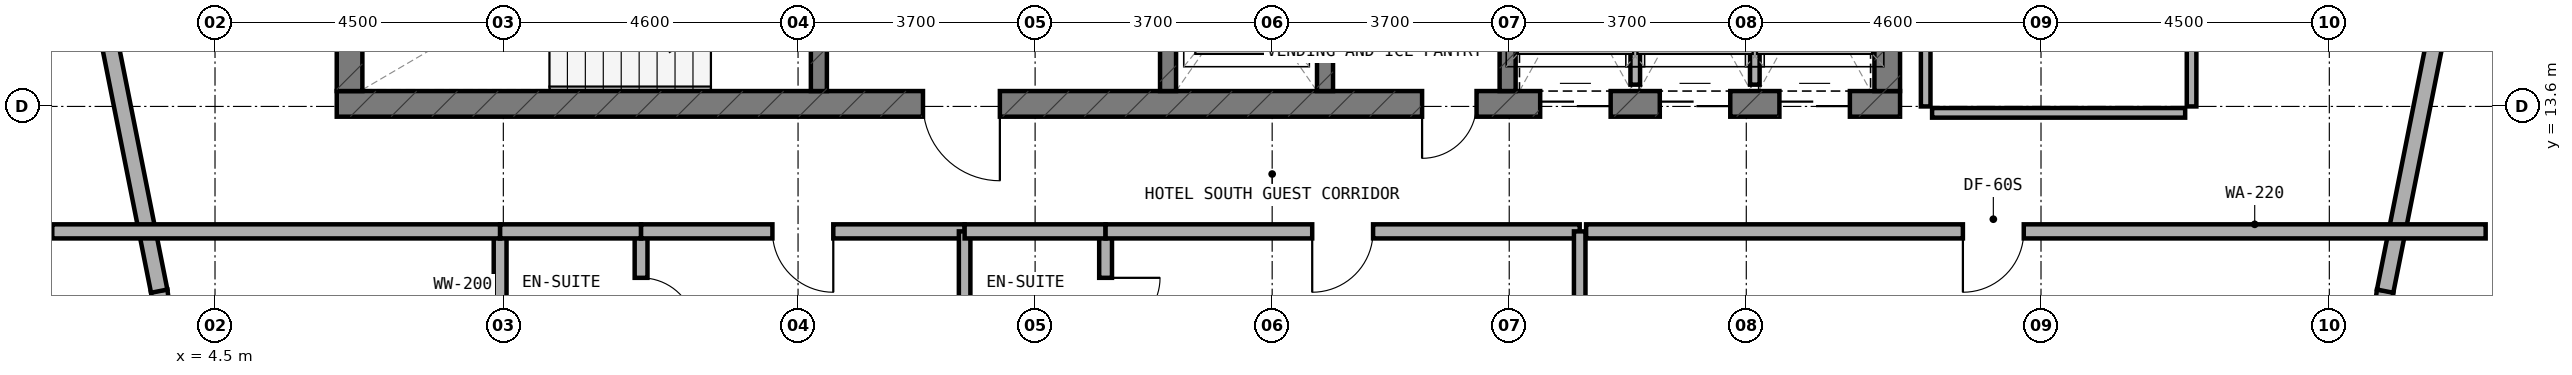
"""IFC4 building model, lengths in metres.
Left out: names, types, materials, properties, quantities, classifications, styles, units other than length and angle.
Written with IfcOpenShell. Run it as: python <this file> out.ifc"""

import sys

from ifc_helpers import new_model, si_unit, direction, frame, frame_2d, origin, place, context, subcontext, project, spatial, rectangle, extrude, element, fill, save


model = new_model("IFC4")
c1 = context("Model", 3, precision=1e-05, world=origin(), true_north=direction((0.0, 1.0)))
c2 = subcontext(c1, "Body", "Model", "MODEL_VIEW")
j1 = project(units=[si_unit("LENGTHUNIT", "METRE"), si_unit("PLANEANGLEUNIT", "RADIAN")], contexts=[c1])
p1 = place(None, origin())
s1 = spatial("IfcSite", under=j1, at=p1, CompositionType="ELEMENT")
p2 = place(p1, origin())
s2 = spatial("IfcBuilding", under=s1, at=p2, CompositionType="ELEMENT")
p3 = place(p2, frame((0.0, 0.0, 199.1)))
s3 = spatial("IfcBuildingStorey", under=s2, at=p3, CompositionType="ELEMENT", Elevation=199.1)
p4 = place(p3, frame((6.4, 13.64, 0.0), z_axis=(0.0, 0.0, 1.0), x_axis=(1.0, 0.0, 0.0)))
e1 = element("IfcWall", 1, at=p4, inside=s3, PredefinedType="SHEAR", context=c2, shape_type="SweptSolid", body=[
    extrude(rectangle(XDim=24.4, YDim=0.4, at=frame_2d((12.2, 0.0))), origin(), (0.0, 0.0, 1.0), 3.6),
])
p5 = place(p4, frame((9.15, 0.0, 0.0)))
e2 = element("IfcOpeningElement", 2, at=p5, cuts=e1, PredefinedType="OPENING", context=c2, shape_type="SweptSolid", body=[
    extrude(rectangle(XDim=1.2, YDim=2.15, at=frame_2d((0.6, 1.075))), frame((0.0, 0.21, 0.0), z_axis=(0.0, -1.0, 0.0), x_axis=(1.0, 0.0, 0.0)), (0.0, 0.0, 1.0), 0.42),
])
p6 = place(p4, frame((16.94, 0.0, 0.0)))
e3 = element("IfcOpeningElement", 3, at=p6, cuts=e1, PredefinedType="OPENING", context=c2, shape_type="SweptSolid", body=[
    extrude(rectangle(XDim=0.85, YDim=2.1, at=frame_2d((0.425, 1.05))), frame((0.0, 0.21, 0.0), z_axis=(0.0, -1.0, 0.0), x_axis=(1.0, 0.0, 0.0)), (0.0, 0.0, 1.0), 0.42),
])
p7 = place(p4, frame((18.783, 0.0, 0.0)))
e4 = element("IfcOpeningElement", 4, at=p7, cuts=e1, PredefinedType="OPENING", context=c2, shape_type="SweptSolid", body=[
    extrude(rectangle(XDim=1.1, YDim=2.15, at=frame_2d((0.55, 1.075))), frame((0.0, 0.21, 0.0), z_axis=(0.0, -1.0, 0.0), x_axis=(1.0, 0.0, 0.0)), (0.0, 0.0, 1.0), 0.42),
])
p8 = place(p4, frame((20.65, 0.0, 0.0)))
e5 = element("IfcOpeningElement", 5, at=p8, cuts=e1, PredefinedType="OPENING", context=c2, shape_type="SweptSolid", body=[
    extrude(rectangle(XDim=1.1, YDim=2.15, at=frame_2d((0.55, 1.075))), frame((0.0, 0.21, 0.0), z_axis=(0.0, -1.0, 0.0), x_axis=(1.0, 0.0, 0.0)), (0.0, 0.0, 1.0), 0.42),
])
p9 = place(p4, frame((22.517, 0.0, 0.0)))
e6 = element("IfcOpeningElement", 6, at=p9, cuts=e1, PredefinedType="OPENING", context=c2, shape_type="SweptSolid", body=[
    extrude(rectangle(XDim=1.1, YDim=2.15, at=frame_2d((0.55, 1.075))), frame((0.0, 0.21, 0.0), z_axis=(0.0, -1.0, 0.0), x_axis=(1.0, 0.0, 0.0)), (0.0, 0.0, 1.0), 0.42),
])
for number, where, z_axis, x_axis in (
    (7, (6.6, 13.84, 0.0), (0.0, 0.0, 1.0), (0.0, 1.0, 0.0)),
    (8, (30.6, 13.84, 0.0), (0.0, 0.0, 1.0), (0.0, 1.0, 0.0)),
):
    element("IfcWall", number, at=place(p3, frame(where, z_axis=z_axis, x_axis=x_axis)), inside=s3, PredefinedType="SHEAR", context=c2, shape_type="SweptSolid", body=[
        extrude(rectangle(XDim=3.16, YDim=0.4, at=frame_2d((1.58, 0.0))), origin(), (0.0, 0.0, 1.0), 3.6),
    ])
p10 = place(p3, frame((13.925, 13.84, 0.0), z_axis=(0.0, 0.0, 1.0), x_axis=(0.0, 1.0, 0.0)))
e9 = element("IfcWall", 9, at=p10, inside=s3, PredefinedType="STANDARD", context=c2, shape_type="SweptSolid", body=[
    extrude(rectangle(XDim=3.16, YDim=0.25, at=frame_2d((1.58, 0.0))), origin(), (0.0, 0.0, 1.0), 3.32),
])
p11 = place(p10, frame((0.98, 0.0, 0.0)))
e10 = element("IfcOpeningElement", 10, at=p11, cuts=e9, PredefinedType="OPENING", context=c2, shape_type="SweptSolid", body=[
    extrude(rectangle(XDim=1.1, YDim=2.15, at=frame_2d((0.55, 1.075))), frame((0.0, 0.135, 0.0), z_axis=(0.0, -1.0, 0.0), x_axis=(1.0, 0.0, 0.0)), (0.0, 0.0, 1.0), 0.27),
])
p12 = place(p3, frame((19.375, 13.84, 0.0), z_axis=(0.0, 0.0, 1.0), x_axis=(0.0, 1.0, 0.0)))
e11 = element("IfcWall", 11, at=p12, inside=s3, PredefinedType="STANDARD", context=c2, shape_type="SweptSolid", body=[
    extrude(rectangle(XDim=3.16, YDim=0.25, at=frame_2d((1.58, 0.0))), origin(), (0.0, 0.0, 1.0), 3.32),
])
p13 = place(p12, frame((0.98, 0.0, 0.0)))
e12 = element("IfcOpeningElement", 12, at=p13, cuts=e11, PredefinedType="OPENING", context=c2, shape_type="SweptSolid", body=[
    extrude(rectangle(XDim=1.1, YDim=2.15, at=frame_2d((0.55, 1.075))), frame((0.0, 0.135, 0.0), z_axis=(0.0, -1.0, 0.0), x_axis=(1.0, 0.0, 0.0)), (0.0, 0.0, 1.0), 0.27),
])
for number, where, z_axis, x_axis in (
    (13, (21.825, 13.84, 0.0), (0.0, 0.0, 1.0), (0.0, 1.0, 0.0)),
    (14, (24.675, 13.84, 0.0), (0.0, 0.0, 1.0), (0.0, 1.0, 0.0)),
):
    element("IfcWall", number, at=place(p3, frame(where, z_axis=z_axis, x_axis=x_axis)), inside=s3, PredefinedType="STANDARD", context=c2, shape_type="SweptSolid", body=[
        extrude(rectangle(XDim=3.16, YDim=0.25, at=frame_2d((1.58, 0.0))), origin(), (0.0, 0.0, 1.0), 3.32),
    ])
p14 = place(p3, frame((3.628, 10.725, 0.0), z_axis=(0.0, 0.0, 1.0), x_axis=(0.130954667764, -0.9913883573, 0.0)))
e15 = element("IfcWall", 15, at=p14, inside=s3, PredefinedType="STANDARD", context=c2, shape_type="SweptSolid", body=[
    extrude(rectangle(XDim=0.833, YDim=0.26, at=frame_2d((0.417, 0.0))), origin(), (0.0, 0.0, 1.0), 3.32),
])
p15 = place(p3, frame((38.259, 9.864, 0.0), z_axis=(0.0, 0.0, 1.0), x_axis=(0.130156359936, 0.991493480548, 0.0)))
e16 = element("IfcWall", 16, at=p15, inside=s3, PredefinedType="STANDARD", context=c2, shape_type="SweptSolid", body=[
    extrude(rectangle(XDim=0.868, YDim=0.26, at=frame_2d((0.434, 0.0))), origin(), (0.0, 0.0, 1.0), 3.32),
])
p16 = place(p3, frame((38.371, 10.717, 0.0), z_axis=(0.0, 0.0, 1.0), x_axis=(0.195291715883, 0.980745199176, 0.0)))
e17 = element("IfcWall", 17, at=p16, inside=s3, PredefinedType="STANDARD", context=c2, shape_type="SweptSolid", body=[
    extrude(rectangle(XDim=8.771, YDim=0.26, at=frame_2d((4.385, 0.0))), origin(), (0.0, 0.0, 1.0), 3.32),
])
p17 = place(p16, frame((3.873, 0.0, 0.85)))
e18 = element("IfcOpeningElement", 18, at=p17, cuts=e17, PredefinedType="OPENING", context=c2, shape_type="SweptSolid", body=[
    extrude(rectangle(XDim=2.1, YDim=1.5, at=frame_2d((1.05, 0.75))), frame((0.0, 0.14, 0.0), z_axis=(0.0, -1.0, 0.0), x_axis=(1.0, 0.0, 0.0)), (0.0, 0.0, 1.0), 0.28),
])
p18 = place(p3, frame((1.916, 19.319, 0.0), z_axis=(0.0, 0.0, 1.0), x_axis=(0.195291715883, -0.980745199176, 0.0)))
e19 = element("IfcWall", 19, at=p18, inside=s3, PredefinedType="STANDARD", context=c2, shape_type="SweptSolid", body=[
    extrude(rectangle(XDim=8.771, YDim=0.26, at=frame_2d((4.385, 0.0))), origin(), (0.0, 0.0, 1.0), 3.32),
])
p19 = place(p18, frame((2.798, 0.0, 0.85)))
e20 = element("IfcOpeningElement", 20, at=p19, cuts=e19, PredefinedType="OPENING", context=c2, shape_type="SweptSolid", body=[
    extrude(rectangle(XDim=2.1, YDim=1.5, at=frame_2d((1.05, 0.75))), frame((0.0, 0.14, 0.0), z_axis=(0.0, -1.0, 0.0), x_axis=(1.0, 0.0, 0.0)), (0.0, 0.0, 1.0), 0.28),
])
p20 = place(p3, frame((26.667, 13.94, 0.0), z_axis=(0.0, 0.0, 1.0), x_axis=(0.0, 1.0, 0.0)))
e21 = element("IfcWall", 21, at=p20, inside=s3, PredefinedType="PARTITIONING", context=c2, shape_type="SweptSolid", body=[
    extrude(rectangle(XDim=2.96, YDim=0.15, at=frame_2d((1.48, 0.0))), origin(), (0.0, 0.0, 1.0), 3.32),
])
p21 = place(p3, frame((28.533, 13.94, 0.0), z_axis=(0.0, 0.0, 1.0), x_axis=(0.0, 1.0, 0.0)))
e22 = element("IfcWall", 22, at=p21, inside=s3, PredefinedType="PARTITIONING", context=c2, shape_type="SweptSolid", body=[
    extrude(rectangle(XDim=2.96, YDim=0.15, at=frame_2d((1.48, 0.0))), origin(), (0.0, 0.0, 1.0), 2.695),
])
p22 = place(p3, frame((11.15, 9.45, 0.0), z_axis=(0.0, 0.0, 1.0), x_axis=(0.0, 1.0, 0.0)))
e23 = element("IfcWall", 23, at=p22, inside=s3, PredefinedType="PLUMBINGWALL", context=c2, shape_type="SweptSolid", body=[
    extrude(rectangle(XDim=2.1, YDim=0.2, at=frame_2d((1.05, 0.0))), origin(), (0.0, 0.0, 1.0), 3.015),
])
p23 = place(p22, frame((0.625, 0.0, 0.0)))
e24 = element("IfcOpeningElement", 24, at=p23, cuts=e23, PredefinedType="OPENING", context=c2, shape_type="SweptSolid", body=[
    extrude(rectangle(XDim=0.85, YDim=2.1, at=frame_2d((0.425, 1.05))), frame((0.0, 0.11, 0.0), z_axis=(0.0, -1.0, 0.0), x_axis=(1.0, 0.0, 0.0)), (0.0, 0.0, 1.0), 0.22),
])
p24 = place(p3, frame((8.95, 9.45, 0.0), z_axis=(0.0, 0.0, 1.0), x_axis=(0.0, 1.0, 0.0)))
e25 = element("IfcWall", 25, at=p24, inside=s3, PredefinedType="PLUMBINGWALL", context=c2, shape_type="SweptSolid", body=[
    extrude(rectangle(XDim=2.1, YDim=0.2, at=frame_2d((1.05, 0.0))), origin(), (0.0, 0.0, 1.0), 3.015),
])
p25 = place(p3, frame((1.96, 11.65, 0.0), z_axis=(0.0, 0.0, 1.0), x_axis=(1.0, 0.0, 0.0)))
e26 = element("IfcWall", 26, at=p25, inside=s3, PredefinedType="SOLIDWALL", context=c2, shape_type="SweptSolid", body=[
    extrude(rectangle(XDim=6.99, YDim=0.22, at=frame_2d((3.495, 0.0))), origin(), (0.0, 0.0, 1.0), 2.695),
])
p26 = place(p3, frame((8.95, 11.65, 0.0), z_axis=(0.0, 0.0, 1.0), x_axis=(1.0, 0.0, 0.0)))
e27 = element("IfcWall", 27, at=p26, inside=s3, PredefinedType="SOLIDWALL", context=c2, shape_type="SweptSolid", body=[
    extrude(rectangle(XDim=2.2, YDim=0.22, at=frame_2d((1.1, 0.0))), origin(), (0.0, 0.0, 1.0), 3.32),
])
p27 = place(p3, frame((11.15, 11.65, 0.0), z_axis=(0.0, 0.0, 1.0), x_axis=(1.0, 0.0, 0.0)))
e28 = element("IfcWall", 28, at=p27, inside=s3, PredefinedType="SOLIDWALL", context=c2, shape_type="SweptSolid", body=[
    extrude(rectangle(XDim=5.05, YDim=0.22, at=frame_2d((2.525, 0.0))), origin(), (0.0, 0.0, 1.0), 2.695),
])
p28 = place(p27, frame((2.05, 0.0, 0.0)))
e29 = element("IfcOpeningElement", 29, at=p28, cuts=e28, PredefinedType="OPENING", context=c2, shape_type="SweptSolid", body=[
    extrude(rectangle(XDim=0.95, YDim=2.1, at=frame_2d((0.475, 1.05))), frame((0.0, 0.12, 0.0), z_axis=(0.0, -1.0, 0.0), x_axis=(1.0, 0.0, 0.0)), (0.0, 0.0, 1.0), 0.24),
])
p29 = place(p3, frame((16.2, 5.86, 0.0), z_axis=(0.0, 0.0, 1.0), x_axis=(0.0, 1.0, 0.0)))
e30 = element("IfcWall", 30, at=p29, inside=s3, PredefinedType="SOLIDWALL", context=c2, shape_type="SweptSolid", body=[
    extrude(rectangle(XDim=5.79, YDim=0.18, at=frame_2d((2.895, 0.0))), origin(), (0.0, 0.0, 1.0), 2.695),
])
p30 = place(p3, frame((18.4, 9.45, 0.0), z_axis=(0.0, 0.0, 1.0), x_axis=(0.0, 1.0, 0.0)))
e31 = element("IfcWall", 31, at=p30, inside=s3, PredefinedType="PLUMBINGWALL", context=c2, shape_type="SweptSolid", body=[
    extrude(rectangle(XDim=2.1, YDim=0.2, at=frame_2d((1.05, 0.0))), origin(), (0.0, 0.0, 1.0), 3.015),
])
p31 = place(p30, frame((0.625, 0.0, 0.0)))
e32 = element("IfcOpeningElement", 32, at=p31, cuts=e31, PredefinedType="OPENING", context=c2, shape_type="SweptSolid", body=[
    extrude(rectangle(XDim=0.85, YDim=2.1, at=frame_2d((0.425, 1.05))), frame((0.0, 0.11, 0.0), z_axis=(0.0, -1.0, 0.0), x_axis=(1.0, 0.0, 0.0)), (0.0, 0.0, 1.0), 0.22),
])
p32 = place(p3, frame((16.2, 11.65, 0.0), z_axis=(0.0, 0.0, 1.0), x_axis=(1.0, 0.0, 0.0)))
e33 = element("IfcWall", 33, at=p32, inside=s3, PredefinedType="SOLIDWALL", context=c2, shape_type="SweptSolid", body=[
    extrude(rectangle(XDim=2.2, YDim=0.22, at=frame_2d((1.1, 0.0))), origin(), (0.0, 0.0, 1.0), 2.695),
])
p33 = place(p3, frame((18.4, 11.65, 0.0), z_axis=(0.0, 0.0, 1.0), x_axis=(1.0, 0.0, 0.0)))
e34 = element("IfcWall", 34, at=p33, inside=s3, PredefinedType="SOLIDWALL", context=c2, shape_type="SweptSolid", body=[
    extrude(rectangle(XDim=7.4, YDim=0.22, at=frame_2d((3.7, 0.0))), origin(), (0.0, 0.0, 1.0), 2.695),
])
p34 = place(p33, frame((3.225, 0.0, 0.0)))
e35 = element("IfcOpeningElement", 35, at=p34, cuts=e34, PredefinedType="OPENING", context=c2, shape_type="SweptSolid", body=[
    extrude(rectangle(XDim=0.95, YDim=2.1, at=frame_2d((0.475, 1.05))), frame((0.0, 0.12, 0.0), z_axis=(0.0, -1.0, 0.0), x_axis=(1.0, 0.0, 0.0)), (0.0, 0.0, 1.0), 0.24),
])
p35 = place(p3, frame((25.8, 5.86, 0.0), z_axis=(0.0, 0.0, 1.0), x_axis=(0.0, 1.0, 0.0)))
e36 = element("IfcWall", 36, at=p35, inside=s3, PredefinedType="SOLIDWALL", context=c2, shape_type="SweptSolid", body=[
    extrude(rectangle(XDim=5.79, YDim=0.18, at=frame_2d((2.895, 0.0))), origin(), (0.0, 0.0, 1.0), 2.695),
])
p36 = place(p3, frame((25.9, 11.65, 0.0), z_axis=(0.0, 0.0, 1.0), x_axis=(1.0, 0.0, 0.0)))
e37 = element("IfcWall", 37, at=p36, inside=s3, PredefinedType="SOLIDWALL", context=c2, shape_type="SweptSolid", body=[
    extrude(rectangle(XDim=14.04, YDim=0.22, at=frame_2d((7.02, 0.0))), origin(), (0.0, 0.0, 1.0), 2.695),
])
p37 = place(p36, frame((5.881, 0.0, 0.0)))
e38 = element("IfcOpeningElement", 38, at=p37, cuts=e37, PredefinedType="OPENING", context=c2, shape_type="SweptSolid", body=[
    extrude(rectangle(XDim=0.95, YDim=2.1, at=frame_2d((0.475, 1.05))), frame((0.0, 0.12, 0.0), z_axis=(0.0, -1.0, 0.0), x_axis=(1.0, 0.0, 0.0)), (0.0, 0.0, 1.0), 0.24),
])
for number, where, z_axis, x_axis in (
    (39, (31.2, 13.6, 0.0), (0.0, 0.0, 1.0), (0.0, 1.0, 0.0)),
    (40, (35.35, 13.6, 0.0), (0.0, 0.0, 1.0), (0.0, 1.0, 0.0)),
):
    element("IfcWall", number, at=place(p3, frame(where, z_axis=z_axis, x_axis=x_axis)), inside=s3, PredefinedType="PARTITIONING", context=c2, shape_type="SweptSolid", body=[
        extrude(rectangle(XDim=22.86, YDim=0.15, at=frame_2d((11.43, 0.0))), origin(), (0.0, 0.0, 1.0), 2.695),
    ])
p38 = place(p3, frame((31.3, 13.5, 0.0), z_axis=(0.0, 0.0, 1.0), x_axis=(1.0, 0.0, 0.0)))
e41 = element("IfcWall", 41, at=p38, inside=s3, PredefinedType="PARTITIONING", context=c2, shape_type="SweptSolid", body=[
    extrude(rectangle(XDim=3.95, YDim=0.15, at=frame_2d((1.975, 0.0))), origin(), (0.0, 0.0, 1.0), 3.015),
])
p39 = place(p5, frame((1.2, 0.0, 0.0), z_axis=(0.0, 0.0, 1.0), x_axis=(-1.0, 0.0, 0.0)))
e42 = element("IfcDoor", 42, at=p39, inside=s3, OperationType="SINGLE_SWING_LEFT", PredefinedType="DOOR", context=c2, shape_type="SweptSolid", body=[
    extrude(rectangle(XDim=1.2, YDim=2.15, at=frame_2d((0.6, 1.075))), frame((0.0, 0.025, 0.0), z_axis=(0.0, -1.0, 0.0), x_axis=(1.0, 0.0, 0.0)), (0.0, 0.0, 1.0), 0.05),
])
fill(e2, e42)
p40 = place(p6, frame((0.85, 0.0, 0.0), z_axis=(0.0, 0.0, 1.0), x_axis=(-1.0, 0.0, 0.0)))
e43 = element("IfcDoor", 43, at=p40, inside=s3, OperationType="SINGLE_SWING_RIGHT", PredefinedType="DOOR", context=c2, shape_type="SweptSolid", body=[
    extrude(rectangle(XDim=0.85, YDim=2.1, at=frame_2d((0.425, 1.05))), frame((0.0, 0.025, 0.0), z_axis=(0.0, -1.0, 0.0), x_axis=(1.0, 0.0, 0.0)), (0.0, 0.0, 1.0), 0.05),
])
fill(e3, e43)
p41 = place(p7, frame((1.1, 0.0, 0.0), z_axis=(0.0, 0.0, 1.0), x_axis=(-1.0, 0.0, 0.0)))
e44 = element("IfcDoor", 44, at=p41, inside=s3, OperationType="DOUBLE_DOOR_SLIDING", PredefinedType="DOOR", context=c2, shape_type="SweptSolid", body=[
    extrude(rectangle(XDim=1.1, YDim=2.15, at=frame_2d((0.55, 1.075))), frame((0.0, 0.025, 0.0), z_axis=(0.0, -1.0, 0.0), x_axis=(1.0, 0.0, 0.0)), (0.0, 0.0, 1.0), 0.05),
])
fill(e4, e44)
p42 = place(p8, frame((1.1, 0.0, 0.0), z_axis=(0.0, 0.0, 1.0), x_axis=(-1.0, 0.0, 0.0)))
e45 = element("IfcDoor", 45, at=p42, inside=s3, OperationType="DOUBLE_DOOR_SLIDING", PredefinedType="DOOR", context=c2, shape_type="SweptSolid", body=[
    extrude(rectangle(XDim=1.1, YDim=2.15, at=frame_2d((0.55, 1.075))), frame((0.0, 0.025, 0.0), z_axis=(0.0, -1.0, 0.0), x_axis=(1.0, 0.0, 0.0)), (0.0, 0.0, 1.0), 0.05),
])
fill(e5, e45)
p43 = place(p9, frame((1.1, 0.0, 0.0), z_axis=(0.0, 0.0, 1.0), x_axis=(-1.0, 0.0, 0.0)))
e46 = element("IfcDoor", 46, at=p43, inside=s3, OperationType="DOUBLE_DOOR_SLIDING", PredefinedType="DOOR", context=c2, shape_type="SweptSolid", body=[
    extrude(rectangle(XDim=1.1, YDim=2.15, at=frame_2d((0.55, 1.075))), frame((0.0, 0.025, 0.0), z_axis=(0.0, -1.0, 0.0), x_axis=(1.0, 0.0, 0.0)), (0.0, 0.0, 1.0), 0.05),
])
fill(e6, e46)
p44 = place(p23, frame((0.85, 0.0, 0.0), z_axis=(0.0, 0.0, 1.0), x_axis=(-1.0, 0.0, 0.0)))
e47 = element("IfcDoor", 47, at=p44, inside=s3, OperationType="SINGLE_SWING_RIGHT", PredefinedType="DOOR", context=c2, shape_type="SweptSolid", body=[
    extrude(rectangle(XDim=0.85, YDim=2.1, at=frame_2d((0.425, 1.05))), frame((0.0, 0.025, 0.0), z_axis=(0.0, -1.0, 0.0), x_axis=(1.0, 0.0, 0.0)), (0.0, 0.0, 1.0), 0.05),
])
fill(e24, e47)
p45 = place(p28, frame((0.95, 0.0, 0.0), z_axis=(0.0, 0.0, 1.0), x_axis=(-1.0, 0.0, 0.0)))
e48 = element("IfcDoor", 48, at=p45, inside=s3, OperationType="SINGLE_SWING_LEFT", PredefinedType="DOOR", context=c2, shape_type="SweptSolid", body=[
    extrude(rectangle(XDim=0.95, YDim=2.1, at=frame_2d((0.475, 1.05))), frame((0.0, 0.025, 0.0), z_axis=(0.0, -1.0, 0.0), x_axis=(1.0, 0.0, 0.0)), (0.0, 0.0, 1.0), 0.05),
])
fill(e29, e48)
p46 = place(p31, frame((0.85, 0.0, 0.0), z_axis=(0.0, 0.0, 1.0), x_axis=(-1.0, 0.0, 0.0)))
e49 = element("IfcDoor", 49, at=p46, inside=s3, OperationType="SINGLE_SWING_LEFT", PredefinedType="DOOR", context=c2, shape_type="SweptSolid", body=[
    extrude(rectangle(XDim=0.85, YDim=2.1, at=frame_2d((0.425, 1.05))), frame((0.0, 0.025, 0.0), z_axis=(0.0, -1.0, 0.0), x_axis=(1.0, 0.0, 0.0)), (0.0, 0.0, 1.0), 0.05),
])
fill(e32, e49)
p47 = place(p34, frame((0.95, 0.0, 0.0), z_axis=(0.0, 0.0, 1.0), x_axis=(-1.0, 0.0, 0.0)))
e50 = element("IfcDoor", 50, at=p47, inside=s3, OperationType="SINGLE_SWING_RIGHT", PredefinedType="DOOR", context=c2, shape_type="SweptSolid", body=[
    extrude(rectangle(XDim=0.95, YDim=2.1, at=frame_2d((0.475, 1.05))), frame((0.0, 0.025, 0.0), z_axis=(0.0, -1.0, 0.0), x_axis=(1.0, 0.0, 0.0)), (0.0, 0.0, 1.0), 0.05),
])
fill(e35, e50)
p48 = place(p37, frame((0.95, 0.0, 0.0), z_axis=(0.0, 0.0, 1.0), x_axis=(-1.0, 0.0, 0.0)))
e51 = element("IfcDoor", 51, at=p48, inside=s3, OperationType="SINGLE_SWING_RIGHT", PredefinedType="DOOR", context=c2, shape_type="SweptSolid", body=[
    extrude(rectangle(XDim=0.95, YDim=2.1, at=frame_2d((0.475, 1.05))), frame((0.0, 0.025, 0.0), z_axis=(0.0, -1.0, 0.0), x_axis=(1.0, 0.0, 0.0)), (0.0, 0.0, 1.0), 0.05),
])
fill(e38, e51)
save(model, sys.argv[1])
